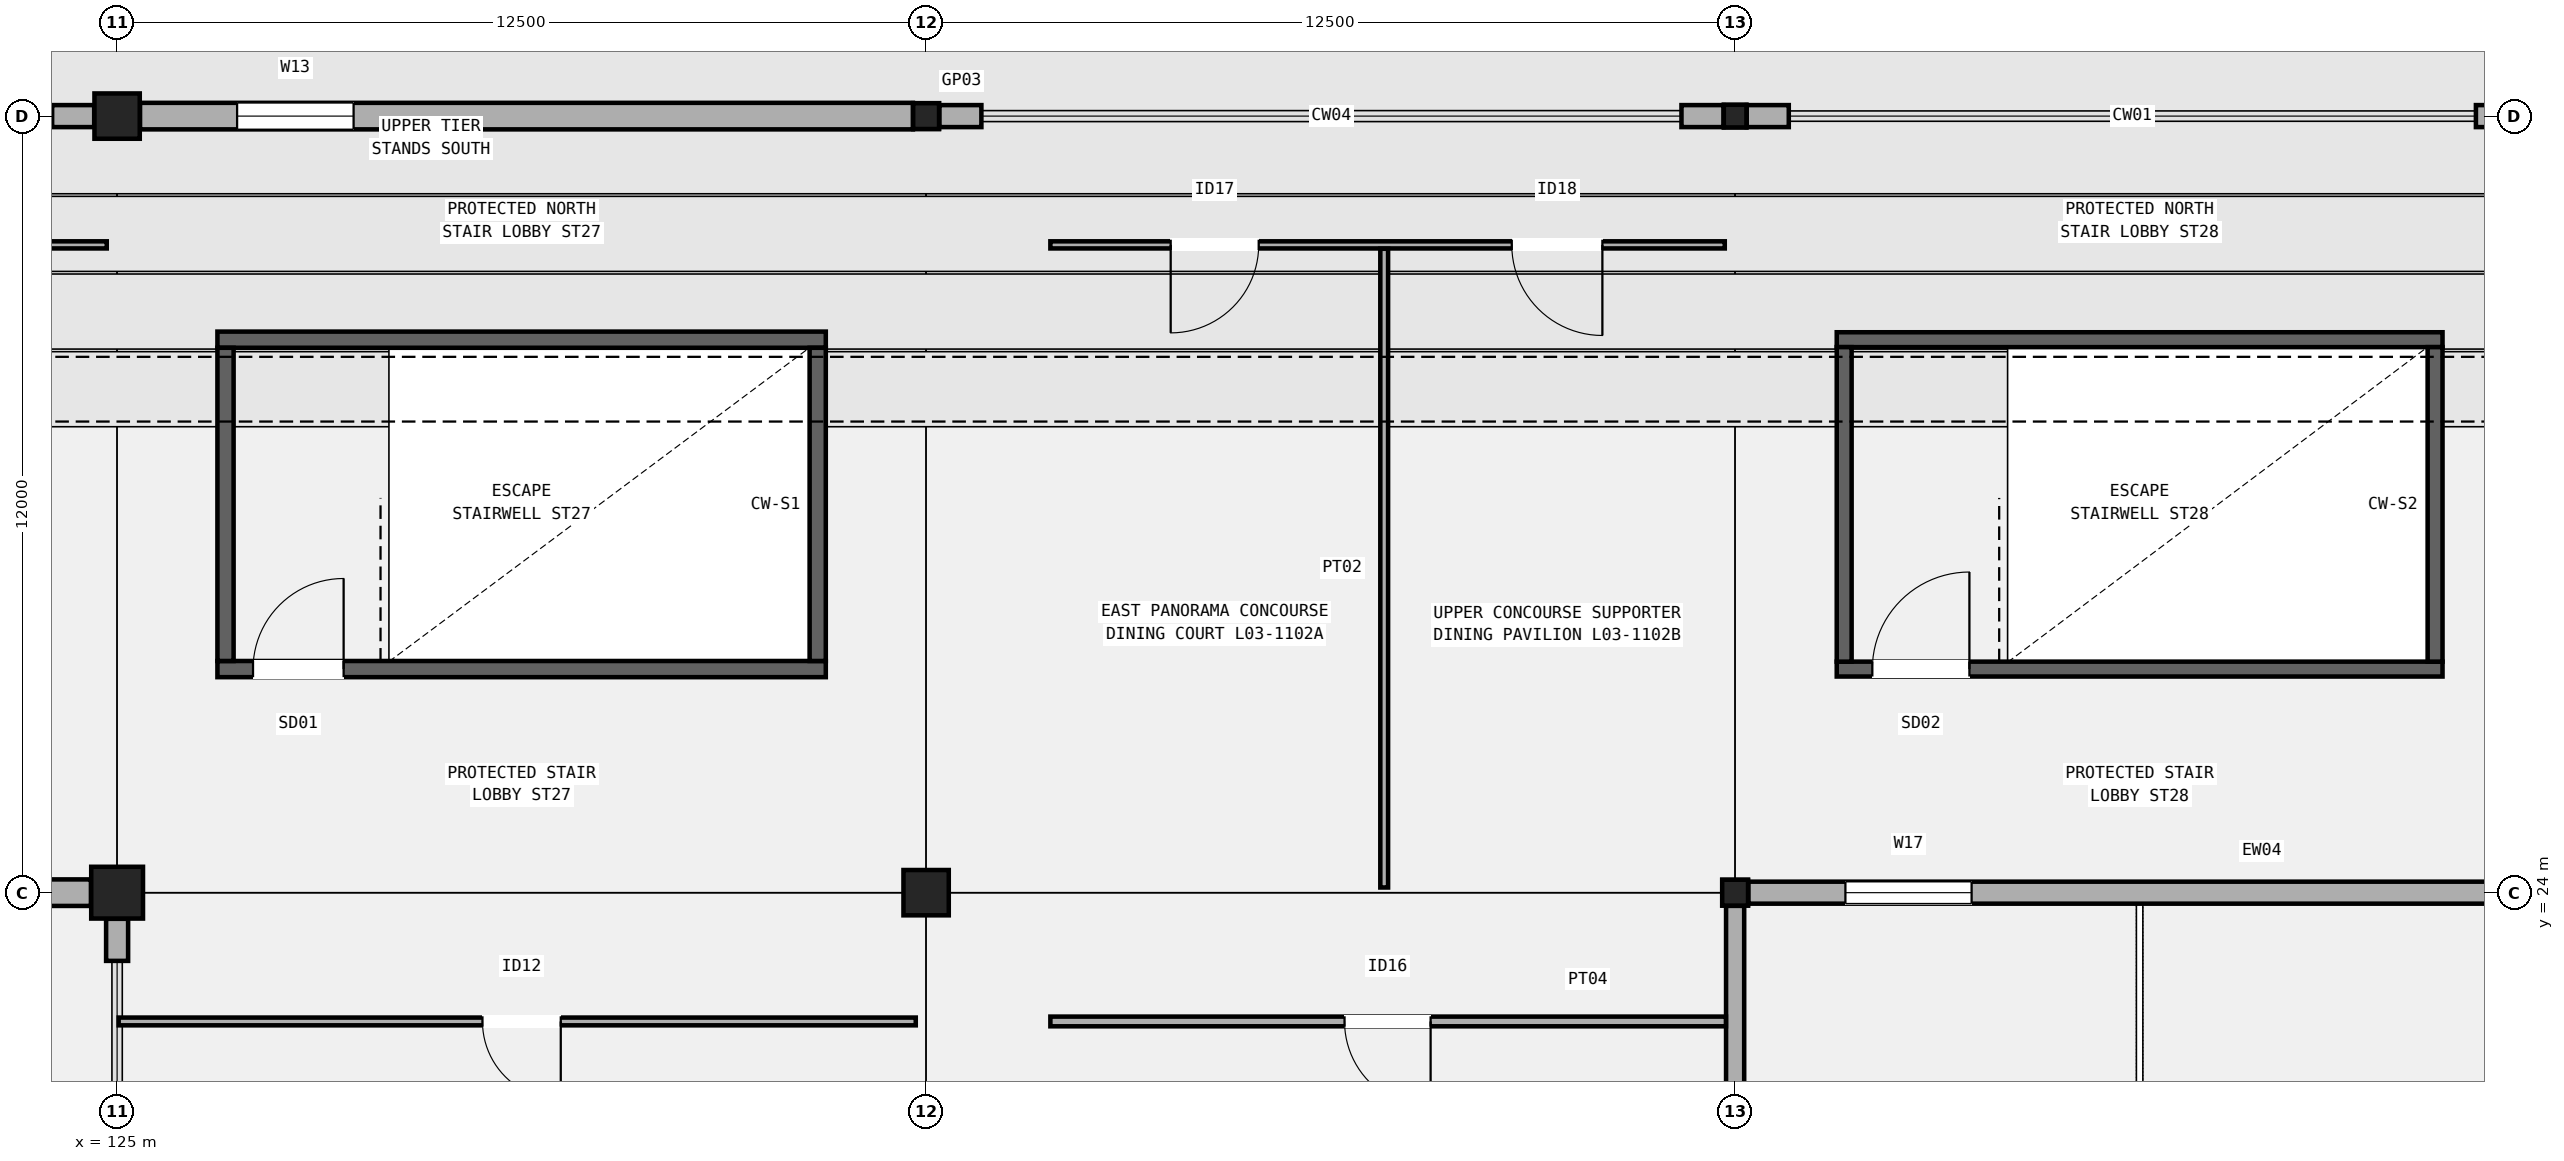
"""IFC4 building model, lengths in metres.
Left out: names, types, materials, properties, quantities, classifications, styles, units other than length and angle.
Written with IfcOpenShell. Run it as: python <this file> out.ifc"""

import sys

from ifc_helpers import new_model, si_unit, direction, frame, frame_2d, origin, origin_2d, place, context, subcontext, project, spatial, rectangle, hollow_rectangle, extrude, element, fill, save


model = new_model("IFC4")
c1 = context("Model", 3, precision=1e-05, world=origin(), true_north=direction((0.0, 1.0)))
c2 = subcontext(c1, "Body", "Model", "MODEL_VIEW")
j1 = project(units=[si_unit("LENGTHUNIT", "METRE"), si_unit("PLANEANGLEUNIT", "RADIAN")], contexts=[c1])
p1 = place(None, origin())
s1 = spatial("IfcSite", under=j1, at=p1, CompositionType="ELEMENT")
p2 = place(p1, origin())
s2 = spatial("IfcBuilding", under=s1, at=p2, CompositionType="ELEMENT")
p3 = place(p2, frame((0.0, 0.0, 15.3)))
s3 = spatial("IfcBuildingStorey", under=s2, at=p3, CompositionType="ELEMENT", Elevation=15.3)
p4 = place(p3, frame((125.0, 24.0, 0.0), z_axis=(0.0, 0.0, 1.0), x_axis=(1.0, 0.0, 0.0)))
e1 = element("IfcColumn", 1, at=p4, inside=s3, PredefinedType="COLUMN", context=c2, shape_type="SweptSolid", body=[
    extrude(rectangle(XDim=0.8, YDim=0.8, at=origin_2d()), origin(), (0.0, 0.0, 1.0), 5.1),
])
for number, where, z_axis, x_axis in (
    (2, (125.0, 36.0, 0.0), (0.0, 0.0, 1.0), (1.0, 0.0, 0.0)),
    (3, (137.5, 24.0, 0.0), (0.0, 0.0, 1.0), (1.0, 0.0, 0.0)),
):
    element("IfcColumn", number, at=place(p3, frame(where, z_axis=z_axis, x_axis=x_axis)), inside=s3, PredefinedType="COLUMN", context=c2, shape_type="SweptSolid", body=[
        extrude(rectangle(XDim=0.7, YDim=0.7, at=origin_2d()), origin(), (0.0, 0.0, 1.0), 5.1),
    ])
for number, where, z_axis, x_axis in (
    (4, (137.5, 36.0, 0.0), (0.0, 0.0, 1.0), (1.0, 0.0, 0.0)),
    (5, (150.0, 24.0, 0.0), (0.0, 0.0, 1.0), (1.0, 0.0, 0.0)),
):
    element("IfcColumn", number, at=place(p3, frame(where, z_axis=z_axis, x_axis=x_axis)), inside=s3, PredefinedType="COLUMN", context=c2, shape_type="SweptSolid", body=[
        extrude(hollow_rectangle(XDim=0.4, YDim=0.4, WallThickness=0.016, InnerFilletRadius=0.016, OuterFilletRadius=0.032, at=origin_2d()), origin(), (0.0, 0.0, 1.0), 5.1),
    ])
p5 = place(p3, frame((150.0, 36.0, 0.0), z_axis=(0.0, 0.0, 1.0), x_axis=(1.0, 0.0, 0.0)))
e6 = element("IfcColumn", 6, at=p5, inside=s3, PredefinedType="COLUMN", context=c2, shape_type="SweptSolid", body=[
    extrude(hollow_rectangle(XDim=0.35, YDim=0.35, WallThickness=0.016, InnerFilletRadius=0.016, OuterFilletRadius=0.032, at=origin_2d()), origin(), (0.0, 0.0, 1.0), 5.1),
])
p6 = place(p3, frame((112.179, 24.0, 0.0), z_axis=(0.0, 0.0, 1.0), x_axis=(1.0, 0.0, 0.0)))
e7 = element("IfcWall", 7, at=p6, inside=s3, PredefinedType="SOLIDWALL", context=c2, shape_type="SweptSolid", body=[
    extrude(rectangle(XDim=12.417, YDim=0.41, at=frame_2d((6.208, 0.0))), origin(), (0.0, 0.0, 1.0), 4.172),
])
p7 = place(p6, frame((1.5, 0.0, 0.95)))
e8 = element("IfcOpeningElement", 8, at=p7, cuts=e7, PredefinedType="OPENING", context=c2, shape_type="SweptSolid", body=[
    extrude(rectangle(XDim=1.5, YDim=1.8, at=frame_2d((0.75, 0.9))), frame((0.0, 0.215, 0.0), z_axis=(0.0, -1.0, 0.0), x_axis=(1.0, 0.0, 0.0)), (0.0, 0.0, 1.0), 0.43),
])
p8 = place(p3, frame((123.996, 36.0, 0.0), z_axis=(0.0, 0.0, 1.0), x_axis=(1.0, 0.0, 0.0)))
e9 = element("IfcWall", 9, at=p8, inside=s3, PredefinedType="SOLIDWALL", context=c2, shape_type="SweptSolid", body=[
    extrude(rectangle(XDim=0.65, YDim=0.34, at=frame_2d((0.325, 0.0))), origin(), (0.0, 0.0, 1.0), 4.06),
])
p9 = place(p3, frame((125.0, 22.946, 0.0), z_axis=(0.0, 0.0, 1.0), x_axis=(0.0, 1.0, 0.0)))
e10 = element("IfcWall", 10, at=p9, inside=s3, PredefinedType="SOLIDWALL", context=c2, shape_type="SweptSolid", body=[
    extrude(rectangle(XDim=0.65, YDim=0.34, at=frame_2d((0.325, 0.0))), origin(), (0.0, 0.0, 1.0), 4.172),
])
p10 = place(p3, frame((125.354, 36.0, 0.0), z_axis=(0.0, 0.0, 1.0), x_axis=(1.0, 0.0, 0.0)))
e11 = element("IfcWall", 11, at=p10, inside=s3, PredefinedType="SOLIDWALL", context=c2, shape_type="SweptSolid", body=[
    extrude(rectangle(XDim=11.942, YDim=0.41, at=frame_2d((5.971, 0.0))), origin(), (0.0, 0.0, 1.0), 4.16),
])
p11 = place(p10, frame((1.5, 0.0, 0.95)))
e12 = element("IfcOpeningElement", 12, at=p11, cuts=e11, PredefinedType="OPENING", context=c2, shape_type="SweptSolid", body=[
    extrude(rectangle(XDim=1.8, YDim=1.75, at=frame_2d((0.9, 0.875))), frame((0.0, 0.215, 0.0), z_axis=(0.0, -1.0, 0.0), x_axis=(1.0, 0.0, 0.0)), (0.0, 0.0, 1.0), 0.43),
])
p12 = place(p3, frame((150.0, 12.354, 0.0), z_axis=(0.0, 0.0, 1.0), x_axis=(0.0, 1.0, 0.0)))
e13 = element("IfcWall", 13, at=p12, inside=s3, PredefinedType="SOLIDWALL", context=c2, shape_type="SweptSolid", body=[
    extrude(rectangle(XDim=11.442, YDim=0.28, at=frame_2d((5.721, 0.0))), origin(), (0.0, 0.0, 1.0), 4.16),
])
p13 = place(p12, frame((1.5, 0.0, 0.95)))
e14 = element("IfcOpeningElement", 14, at=p13, cuts=e13, PredefinedType="OPENING", context=c2, shape_type="SweptSolid", body=[
    extrude(rectangle(XDim=1.8, YDim=2.55, at=frame_2d((0.9, 1.275))), frame((0.0, 0.15, 0.0), z_axis=(0.0, -1.0, 0.0), x_axis=(1.0, 0.0, 0.0)), (0.0, 0.0, 1.0), 0.3),
])
p14 = place(p3, frame((137.704, 36.0, 0.0), z_axis=(0.0, 0.0, 1.0), x_axis=(1.0, 0.0, 0.0)))
e15 = element("IfcWall", 15, at=p14, inside=s3, PredefinedType="SOLIDWALL", context=c2, shape_type="SweptSolid", body=[
    extrude(rectangle(XDim=0.65, YDim=0.34, at=frame_2d((0.325, 0.0))), origin(), (0.0, 0.0, 1.0), 4.172),
])
p15 = place(p3, frame((149.171, 36.0, 0.0), z_axis=(0.0, 0.0, 1.0), x_axis=(1.0, 0.0, 0.0)))
e16 = element("IfcWall", 16, at=p15, inside=s3, PredefinedType="SOLIDWALL", context=c2, shape_type="SweptSolid", body=[
    extrude(rectangle(XDim=0.65, YDim=0.34, at=frame_2d((0.325, 0.0))), origin(), (0.0, 0.0, 1.0), 4.172),
])
p16 = place(p3, frame((150.204, 24.0, 0.0), z_axis=(0.0, 0.0, 1.0), x_axis=(1.0, 0.0, 0.0)))
e17 = element("IfcWall", 17, at=p16, inside=s3, PredefinedType="SOLIDWALL", context=c2, shape_type="SweptSolid", body=[
    extrude(rectangle(XDim=12.117, YDim=0.34, at=frame_2d((6.059, 0.0))), origin(), (0.0, 0.0, 1.0), 4.172),
])
p17 = place(p16, frame((1.5, 0.0, 0.95)))
e18 = element("IfcOpeningElement", 18, at=p17, cuts=e17, PredefinedType="OPENING", context=c2, shape_type="SweptSolid", body=[
    extrude(rectangle(XDim=1.95, YDim=2.35, at=frame_2d((0.975, 1.175))), frame((0.0, 0.18, 0.0), z_axis=(0.0, -1.0, 0.0), x_axis=(1.0, 0.0, 0.0)), (0.0, 0.0, 1.0), 0.36),
])
p18 = place(p3, frame((150.179, 36.0, 0.0), z_axis=(0.0, 0.0, 1.0), x_axis=(1.0, 0.0, 0.0)))
e19 = element("IfcWall", 19, at=p18, inside=s3, PredefinedType="SOLIDWALL", context=c2, shape_type="SweptSolid", body=[
    extrude(rectangle(XDim=0.65, YDim=0.34, at=frame_2d((0.325, 0.0))), origin(), (0.0, 0.0, 1.0), 4.06),
])
p19 = place(p3, frame((161.446, 36.0, 0.0), z_axis=(0.0, 0.0, 1.0), x_axis=(1.0, 0.0, 0.0)))
e20 = element("IfcWall", 20, at=p19, inside=s3, PredefinedType="SOLIDWALL", context=c2, shape_type="SweptSolid", body=[
    extrude(rectangle(XDim=0.65, YDim=0.34, at=frame_2d((0.325, 0.0))), origin(), (0.0, 0.0, 1.0), 4.06),
])
p20 = place(p3, frame((126.55, 27.455, 0.0), z_axis=(0.0, 0.0, 1.0), x_axis=(1.0, 0.0, 0.0)))
e21 = element("IfcWall", 21, at=p20, inside=s3, PredefinedType="SHEAR", context=c2, shape_type="SweptSolid", body=[
    extrude(rectangle(XDim=9.4, YDim=0.25, at=frame_2d((4.7, 0.0))), origin(), (0.0, 0.0, 1.0), 4.86),
])
p21 = place(p20, frame((0.55, 0.0, 0.0)))
e22 = element("IfcOpeningElement", 22, at=p21, cuts=e21, PredefinedType="OPENING", context=c2, shape_type="SweptSolid", body=[
    extrude(rectangle(XDim=1.4, YDim=2.15, at=frame_2d((0.7, 1.075))), frame((0.0, 0.135, 0.0), z_axis=(0.0, -1.0, 0.0), x_axis=(1.0, 0.0, 0.0)), (0.0, 0.0, 1.0), 0.27),
])
p22 = place(p3, frame((126.55, 32.545, 0.0), z_axis=(0.0, 0.0, 1.0), x_axis=(1.0, 0.0, 0.0)))
e23 = element("IfcWall", 23, at=p22, inside=s3, PredefinedType="SHEAR", context=c2, shape_type="SweptSolid", body=[
    extrude(rectangle(XDim=9.4, YDim=0.25, at=frame_2d((4.7, 0.0))), origin(), (0.0, 0.0, 1.0), 4.86),
])
for number, where, z_axis, x_axis in (
    (24, (126.675, 27.58, 0.0), (0.0, 0.0, 1.0), (0.0, 1.0, 0.0)),
    (25, (135.825, 27.58, 0.0), (0.0, 0.0, 1.0), (0.0, 1.0, 0.0)),
):
    element("IfcWall", number, at=place(p3, frame(where, z_axis=z_axis, x_axis=x_axis)), inside=s3, PredefinedType="SHEAR", context=c2, shape_type="SweptSolid", body=[
        extrude(rectangle(XDim=4.84, YDim=0.25, at=frame_2d((2.42, 0.0))), origin(), (0.0, 0.0, 1.0), 4.86),
    ])
p23 = place(p3, frame((151.57, 27.455, 0.0), z_axis=(0.0, 0.0, 1.0), x_axis=(1.0, 0.0, 0.0)))
e26 = element("IfcWall", 26, at=p23, inside=s3, PredefinedType="SHEAR", context=c2, shape_type="SweptSolid", body=[
    extrude(rectangle(XDim=9.36, YDim=0.23, at=frame_2d((4.68, 0.0))), origin(), (0.0, 0.0, 1.0), 4.86),
])
p24 = place(p23, frame((0.55, 0.0, 0.0)))
e27 = element("IfcOpeningElement", 27, at=p24, cuts=e26, PredefinedType="OPENING", context=c2, shape_type="SweptSolid", body=[
    extrude(rectangle(XDim=1.5, YDim=2.2, at=frame_2d((0.75, 1.1))), frame((0.0, 0.125, 0.0), z_axis=(0.0, -1.0, 0.0), x_axis=(1.0, 0.0, 0.0)), (0.0, 0.0, 1.0), 0.25),
])
p25 = place(p3, frame((151.57, 32.545, 0.0), z_axis=(0.0, 0.0, 1.0), x_axis=(1.0, 0.0, 0.0)))
e28 = element("IfcWall", 28, at=p25, inside=s3, PredefinedType="SHEAR", context=c2, shape_type="SweptSolid", body=[
    extrude(rectangle(XDim=9.36, YDim=0.23, at=frame_2d((4.68, 0.0))), origin(), (0.0, 0.0, 1.0), 4.86),
])
for number, where, z_axis, x_axis in (
    (29, (151.685, 27.57, 0.0), (0.0, 0.0, 1.0), (0.0, 1.0, 0.0)),
    (30, (160.815, 27.57, 0.0), (0.0, 0.0, 1.0), (0.0, 1.0, 0.0)),
):
    element("IfcWall", number, at=place(p3, frame(where, z_axis=z_axis, x_axis=x_axis)), inside=s3, PredefinedType="SHEAR", context=c2, shape_type="SweptSolid", body=[
        extrude(rectangle(XDim=4.86, YDim=0.23, at=frame_2d((2.43, 0.0))), origin(), (0.0, 0.0, 1.0), 4.86),
    ])
p26 = place(p3, frame((112.16, 34.01, 0.0), z_axis=(0.0, 0.0, 1.0), x_axis=(1.0, 0.0, 0.0)))
e31 = element("IfcWall", 31, at=p26, inside=s3, PredefinedType="PARTITIONING", context=c2, shape_type="SweptSolid", body=[
    extrude(rectangle(XDim=12.68, YDim=0.11, at=frame_2d((6.34, 0.0))), origin(), (0.0, 0.0, 1.0), 2.77),
])
p27 = place(p26, frame((6.885, 0.0, 0.0), z_axis=(0.0, 0.0, 1.0), x_axis=(-1.0, 0.0, 0.0)))
e32 = element("IfcOpeningElement", 32, at=p27, cuts=e31, PredefinedType="OPENING", context=c2, shape_type="SweptSolid", body=[
    extrude(rectangle(XDim=1.09, YDim=2.16, at=frame_2d((0.545, 1.08))), frame((0.0, 0.065, 0.0), z_axis=(0.0, -1.0, 0.0), x_axis=(1.0, 0.0, 0.0)), (0.0, 0.0, 1.0), 0.13),
])
p28 = place(p3, frame((125.024, 22.01, 0.0), z_axis=(0.0, 0.0, 1.0), x_axis=(1.0, 0.0, 0.0)))
e33 = element("IfcWall", 33, at=p28, inside=s3, PredefinedType="PARTITIONING", context=c2, shape_type="SweptSolid", body=[
    extrude(rectangle(XDim=12.316, YDim=0.12, at=frame_2d((6.158, 0.0))), origin(), (0.0, 0.0, 1.0), 4.22),
])
p29 = place(p28, frame((6.831, 0.0, 0.0), z_axis=(0.0, 0.0, 1.0), x_axis=(-1.0, 0.0, 0.0)))
e34 = element("IfcOpeningElement", 34, at=p29, cuts=e33, PredefinedType="OPENING", context=c2, shape_type="SweptSolid", body=[
    extrude(rectangle(XDim=1.21, YDim=2.18, at=frame_2d((0.605, 1.09))), frame((0.0, 0.07, 0.0), z_axis=(0.0, -1.0, 0.0), x_axis=(1.0, 0.0, 0.0)), (0.0, 0.0, 1.0), 0.14),
])
p30 = place(p3, frame((139.42, 22.01, 0.0), z_axis=(0.0, 0.0, 1.0), x_axis=(1.0, 0.0, 0.0)))
e35 = element("IfcWall", 35, at=p30, inside=s3, PredefinedType="PARTITIONING", context=c2, shape_type="SweptSolid", body=[
    extrude(rectangle(XDim=10.438, YDim=0.15, at=frame_2d((5.219, 0.0))), origin(), (0.0, 0.0, 1.0), 4.22),
])
p31 = place(p30, frame((5.875, 0.0, 0.0), z_axis=(0.0, 0.0, 1.0), x_axis=(-1.0, 0.0, 0.0)))
e36 = element("IfcOpeningElement", 36, at=p31, cuts=e35, PredefinedType="OPENING", context=c2, shape_type="SweptSolid", body=[
    extrude(rectangle(XDim=1.33, YDim=2.22, at=frame_2d((0.665, 1.11))), frame((0.0, 0.085, 0.0), z_axis=(0.0, -1.0, 0.0), x_axis=(1.0, 0.0, 0.0)), (0.0, 0.0, 1.0), 0.17),
])
p32 = place(p3, frame((139.42, 34.01, 0.0), z_axis=(0.0, 0.0, 1.0), x_axis=(1.0, 0.0, 0.0)))
e37 = element("IfcWall", 37, at=p32, inside=s3, PredefinedType="PARTITIONING", context=c2, shape_type="SweptSolid", body=[
    extrude(rectangle(XDim=10.42, YDim=0.11, at=frame_2d((5.21, 0.0))), origin(), (0.0, 0.0, 1.0), 2.77),
])
p33 = place(p32, frame((3.219, 0.0, 0.0), z_axis=(0.0, 0.0, 1.0), x_axis=(-1.0, 0.0, 0.0)))
e38 = element("IfcOpeningElement", 38, at=p33, cuts=e37, PredefinedType="OPENING", context=c2, shape_type="SweptSolid", body=[
    extrude(rectangle(XDim=1.36, YDim=2.25, at=frame_2d((0.68, 1.125))), frame((0.0, 0.065, 0.0), z_axis=(0.0, -1.0, 0.0), x_axis=(1.0, 0.0, 0.0)), (0.0, 0.0, 1.0), 0.13),
])
p34 = place(p32, frame((8.529, 0.0, 0.0), z_axis=(0.0, 0.0, 1.0), x_axis=(-1.0, 0.0, 0.0)))
e39 = element("IfcOpeningElement", 39, at=p34, cuts=e37, PredefinedType="OPENING", context=c2, shape_type="SweptSolid", body=[
    extrude(rectangle(XDim=1.4, YDim=2.24, at=frame_2d((0.7, 1.12))), frame((0.0, 0.065, 0.0), z_axis=(0.0, -1.0, 0.0), x_axis=(1.0, 0.0, 0.0)), (0.0, 0.0, 1.0), 0.13),
])
p35 = place(p3, frame((144.578, 24.08, 0.0), z_axis=(0.0, 0.0, 1.0), x_axis=(0.0, 1.0, 0.0)))
e40 = element("IfcWall", 40, at=p35, inside=s3, PredefinedType="PARTITIONING", context=c2, shape_type="SweptSolid", body=[
    extrude(rectangle(XDim=9.87, YDim=0.12, at=frame_2d((4.935, 0.0))), origin(), (0.0, 0.0, 1.0), 2.77),
])
p36 = place(p11, origin())
e41 = element("IfcWindow", 41, at=p36, inside=s3, PartitioningType="SINGLE_PANEL", PredefinedType="WINDOW", context=c2, shape_type="SweptSolid", body=[
    extrude(rectangle(XDim=1.8, YDim=1.75, at=frame_2d((0.9, 0.875))), frame((0.0, 0.03, 0.0), z_axis=(0.0, -1.0, 0.0), x_axis=(1.0, 0.0, 0.0)), (0.0, 0.0, 1.0), 0.06),
])
fill(e12, e41)
p37 = place(p17, origin())
e42 = element("IfcWindow", 42, at=p37, inside=s3, PartitioningType="SINGLE_PANEL", PredefinedType="WINDOW", context=c2, shape_type="SweptSolid", body=[
    extrude(rectangle(XDim=1.95, YDim=2.35, at=frame_2d((0.975, 1.175))), frame((0.0, 0.03, 0.0), z_axis=(0.0, -1.0, 0.0), x_axis=(1.0, 0.0, 0.0)), (0.0, 0.0, 1.0), 0.06),
])
fill(e18, e42)
p38 = place(p21, origin())
e43 = element("IfcDoor", 43, at=p38, inside=s3, OperationType="SINGLE_SWING_RIGHT", PredefinedType="DOOR", context=c2, shape_type="SweptSolid", body=[
    extrude(rectangle(XDim=1.4, YDim=2.15, at=frame_2d((0.7, 1.075))), frame((0.0, 0.025, 0.0), z_axis=(0.0, -1.0, 0.0), x_axis=(1.0, 0.0, 0.0)), (0.0, 0.0, 1.0), 0.05),
])
fill(e22, e43)
p39 = place(p24, origin())
e44 = element("IfcDoor", 44, at=p39, inside=s3, OperationType="SINGLE_SWING_RIGHT", PredefinedType="DOOR", context=c2, shape_type="SweptSolid", body=[
    extrude(rectangle(XDim=1.5, YDim=2.2, at=frame_2d((0.75, 1.1))), frame((0.0, 0.025, 0.0), z_axis=(0.0, -1.0, 0.0), x_axis=(1.0, 0.0, 0.0)), (0.0, 0.0, 1.0), 0.05),
])
fill(e27, e44)
p40 = place(p29, origin())
e45 = element("IfcDoor", 45, at=p40, inside=s3, OperationType="SINGLE_SWING_LEFT", PredefinedType="DOOR", context=c2, shape_type="SweptSolid", body=[
    extrude(rectangle(XDim=1.21, YDim=2.18, at=frame_2d((0.605, 1.09))), frame((0.0, 0.025, 0.0), z_axis=(0.0, -1.0, 0.0), x_axis=(1.0, 0.0, 0.0)), (0.0, 0.0, 1.0), 0.05),
])
fill(e34, e45)
p41 = place(p31, origin())
e46 = element("IfcDoor", 46, at=p41, inside=s3, OperationType="SINGLE_SWING_LEFT", PredefinedType="DOOR", context=c2, shape_type="SweptSolid", body=[
    extrude(rectangle(XDim=1.33, YDim=2.22, at=frame_2d((0.665, 1.11))), frame((0.0, 0.025, 0.0), z_axis=(0.0, -1.0, 0.0), x_axis=(1.0, 0.0, 0.0)), (0.0, 0.0, 1.0), 0.05),
])
fill(e36, e46)
p42 = place(p33, origin())
e47 = element("IfcDoor", 47, at=p42, inside=s3, OperationType="SINGLE_SWING_RIGHT", PredefinedType="DOOR", context=c2, shape_type="SweptSolid", body=[
    extrude(rectangle(XDim=1.36, YDim=2.25, at=frame_2d((0.68, 1.125))), frame((0.0, 0.025, 0.0), z_axis=(0.0, -1.0, 0.0), x_axis=(1.0, 0.0, 0.0)), (0.0, 0.0, 1.0), 0.05),
])
fill(e38, e47)
p43 = place(p34, origin())
e48 = element("IfcDoor", 48, at=p43, inside=s3, OperationType="SINGLE_SWING_LEFT", PredefinedType="DOOR", context=c2, shape_type="SweptSolid", body=[
    extrude(rectangle(XDim=1.4, YDim=2.24, at=frame_2d((0.7, 1.12))), frame((0.0, 0.025, 0.0), z_axis=(0.0, -1.0, 0.0), x_axis=(1.0, 0.0, 0.0)), (0.0, 0.0, 1.0), 0.05),
])
fill(e39, e48)
save(model, sys.argv[1])
